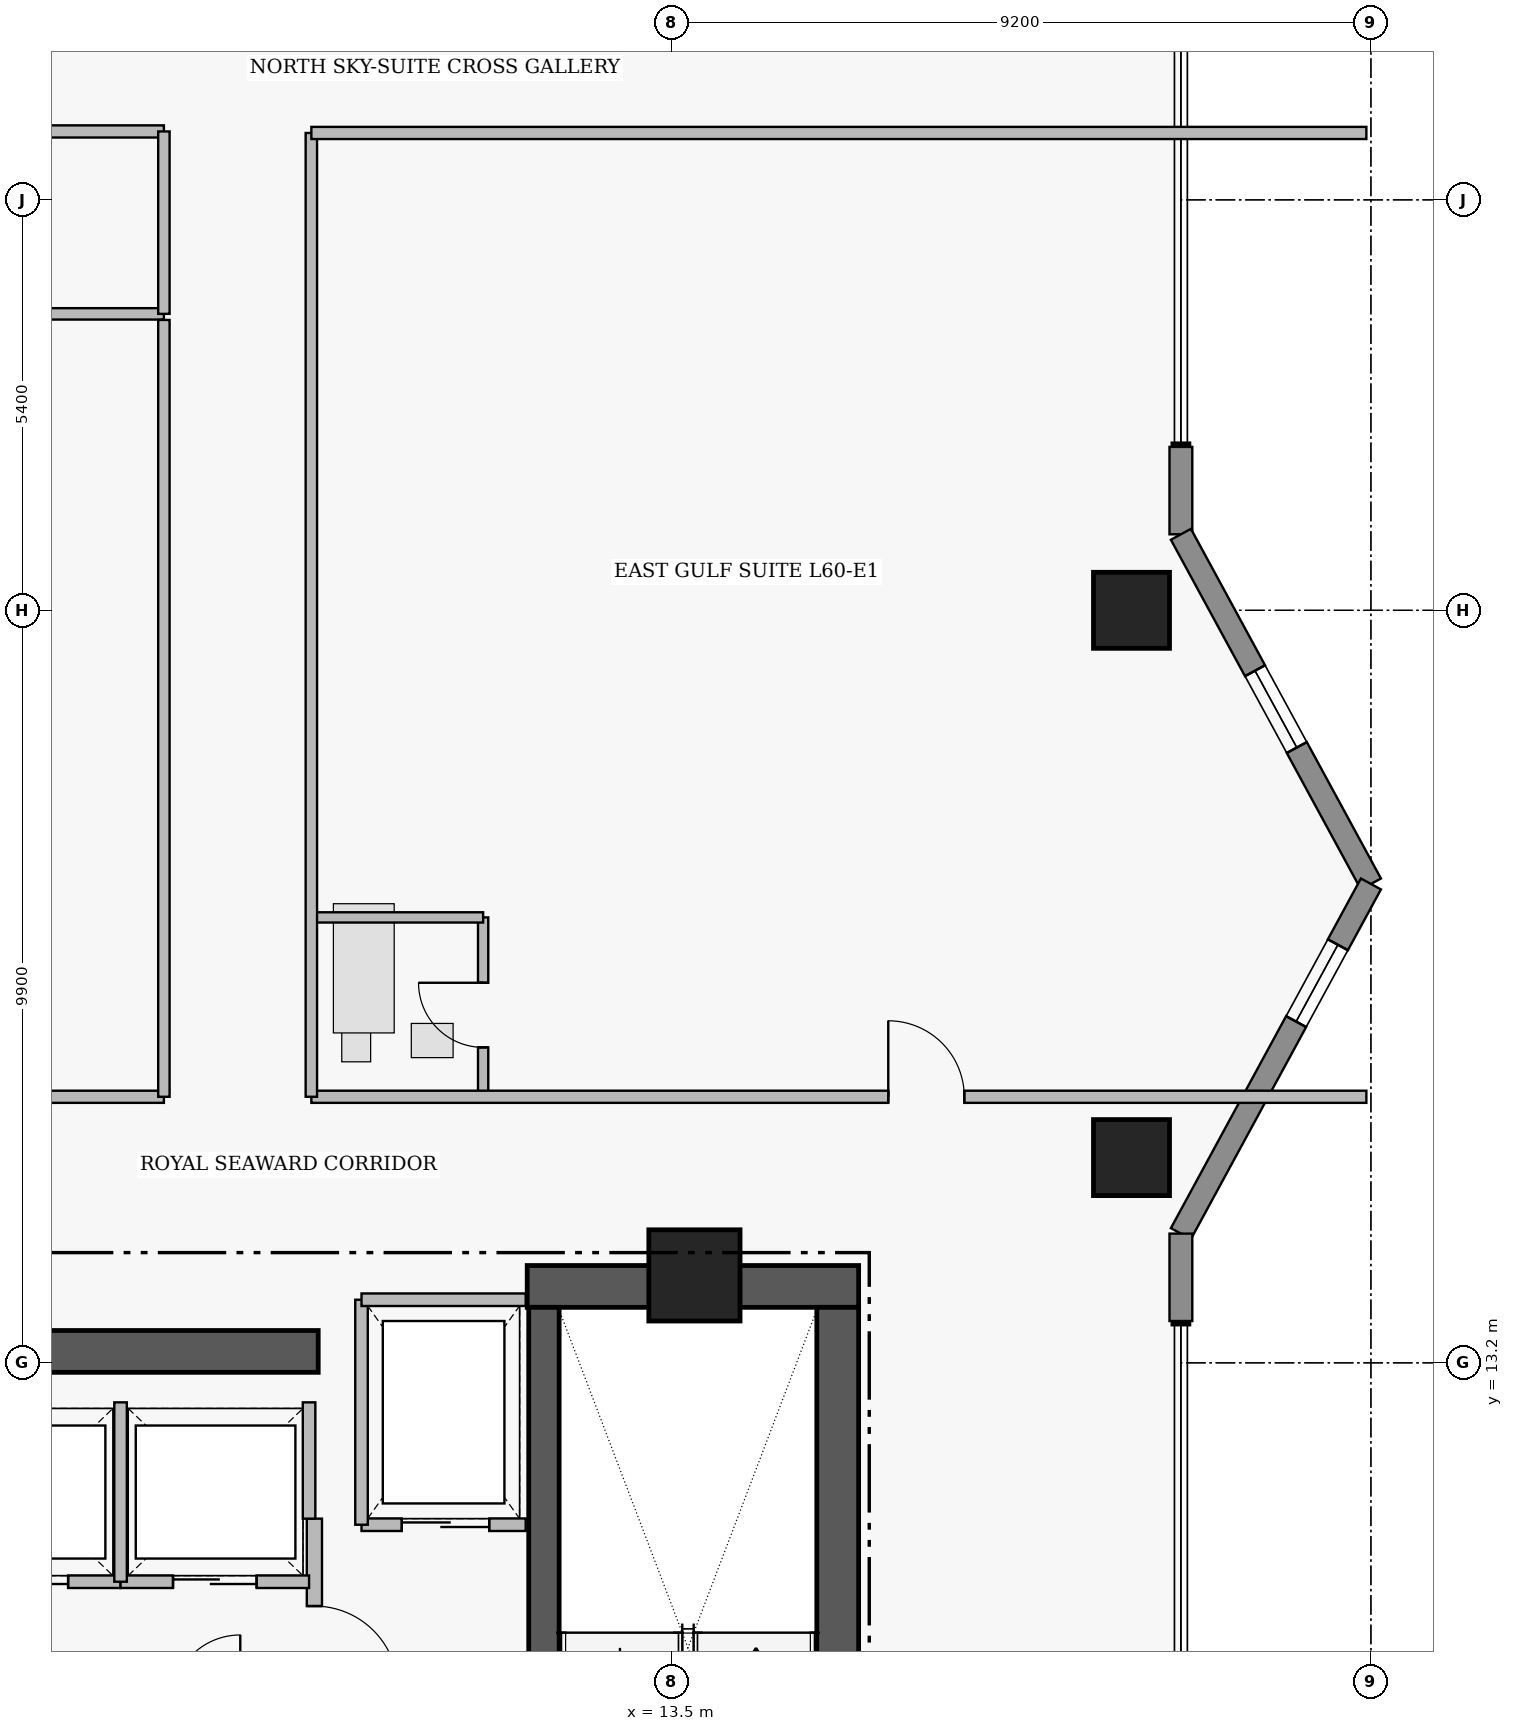
"""IFC4 building model, lengths in metres.
Left out: names, types, materials, properties, quantities, classifications, styles, units other than length and angle.
Written with IfcOpenShell. Run it as: python <this file> out.ifc"""

import sys

from ifc_helpers import new_model, si_unit, direction, frame, frame_2d, origin, origin_2d, place, context, subcontext, project, spatial, rectangle, extrude, element, fill, save


model = new_model("IFC4")
c1 = context("Model", 3, precision=1e-05, world=origin(), true_north=direction((0.0, 1.0)))
c2 = subcontext(c1, "Body", "Model", "MODEL_VIEW")
j1 = project(units=[si_unit("LENGTHUNIT", "METRE"), si_unit("PLANEANGLEUNIT", "RADIAN")], contexts=[c1])
p1 = place(None, origin())
s1 = spatial("IfcSite", under=j1, at=p1, CompositionType="ELEMENT")
p2 = place(p1, origin())
s2 = spatial("IfcBuilding", under=s1, at=p2, CompositionType="ELEMENT")
p3 = place(p2, frame((0.0, 0.0, 239.65)))
s3 = spatial("IfcBuildingStorey", under=s2, at=p3, CompositionType="ELEMENT", Elevation=239.65)
p4 = place(p3, frame((11.6, 14.205, 0.0), z_axis=(0.0, 0.0, 1.0), x_axis=(1.0, 0.0, 0.0)))
e1 = element("IfcWall", 1, at=p4, inside=s3, PredefinedType="SHEAR", context=c2, shape_type="SweptSolid", body=[
    extrude(rectangle(XDim=4.36, YDim=0.55, at=frame_2d((2.18, 0.0))), origin(), (0.0, 0.0, 1.0), 3.51),
])
p5 = place(p3, frame((15.685, 4.97, 0.0), z_axis=(0.0, 0.0, 1.0), x_axis=(0.0, 1.0, 0.0)))
e2 = element("IfcWall", 2, at=p5, inside=s3, PredefinedType="SHEAR", context=c2, shape_type="SweptSolid", body=[
    extrude(rectangle(XDim=8.96, YDim=0.55, at=frame_2d((4.48, 0.0))), origin(), (0.0, 0.0, 1.0), 3.51),
])
p6 = place(p3, frame((1.25, 13.35, 0.0), z_axis=(0.0, 0.0, 1.0), x_axis=(1.0, 0.0, 0.0)))
e3 = element("IfcWall", 3, at=p6, inside=s3, PredefinedType="SHEAR", context=c2, shape_type="SweptSolid", body=[
    extrude(rectangle(XDim=7.6, YDim=0.55, at=frame_2d((3.8, 0.0))), origin(), (0.0, 0.0, 1.0), 3.48),
])
p7 = place(p3, frame((11.82, 13.93, 0.0), z_axis=(0.0, 0.0, 1.0), x_axis=(0.0, -1.0, 0.0)))
e4 = element("IfcWall", 4, at=p7, inside=s3, PredefinedType="SHEAR", context=c2, shape_type="SweptSolid", body=[
    extrude(rectangle(XDim=8.96, YDim=0.4, at=frame_2d((4.48, 0.0))), origin(), (0.0, 0.0, 1.0), 3.51),
])
p8 = place(p7, frame((7.53, 0.0, 0.0)))
e5 = element("IfcOpeningElement", 5, at=p8, cuts=e4, PredefinedType="OPENING", context=c2, shape_type="SweptSolid", body=[
    extrude(rectangle(XDim=1.12, YDim=2.22, at=frame_2d((0.56, 1.11))), frame((0.0, 0.21, 0.0), z_axis=(0.0, -1.0, 0.0), x_axis=(1.0, 0.0, 0.0)), (0.0, 0.0, 1.0), 0.42),
])
p9 = place(p3, frame((13.8, 14.35, 0.0), z_axis=(0.0, 0.0, 1.0), x_axis=(1.0, 0.0, 0.0)))
e6 = element("IfcColumn", 6, at=p9, inside=s3, PredefinedType="COLUMN", context=c2, shape_type="SweptSolid", body=[
    extrude(rectangle(XDim=1.2, YDim=1.2, at=origin_2d()), origin(), (0.0, 0.0, 1.0), 3.7),
])
for number, where, z_axis, x_axis in (
    (7, (19.55, 15.9, 0.43), (0.0, 0.0, 1.0), (1.0, 0.0, 0.0)),
    (8, (19.55, 23.1, 0.43), (0.0, 0.0, 1.0), (1.0, 0.0, 0.0)),
):
    element("IfcColumn", number, at=place(p3, frame(where, z_axis=z_axis, x_axis=x_axis)), inside=s3, PredefinedType="COLUMN", context=c2, shape_type="SweptSolid", body=[
        extrude(rectangle(XDim=1.0, YDim=1.0, at=origin_2d()), origin(), (0.0, 0.0, 1.0), 3.27),
    ])
p10 = place(p3, frame((20.2, 25.25, 0.0), z_axis=(0.0, 0.0, 1.0), x_axis=(0.0, -1.0, 0.0)))
e9 = element("IfcWall", 9, at=p10, inside=s3, PredefinedType="STANDARD", context=c2, shape_type="SweptSolid", body=[
    extrude(rectangle(XDim=1.15, YDim=0.3, at=frame_2d((0.575, 0.0))), origin(), (0.0, 0.0, 1.0), 3.48),
])
p11 = place(p3, frame((20.2, 24.1, 0.0), z_axis=(0.0, 0.0, 1.0), x_axis=(0.477505494629, -0.878628762675, 0.0)))
e10 = element("IfcWall", 10, at=p11, inside=s3, PredefinedType="STANDARD", context=c2, shape_type="SweptSolid", body=[
    extrude(rectangle(XDim=5.236, YDim=0.3, at=frame_2d((2.618, 0.0))), origin(), (0.0, 0.0, 1.0), 3.48),
])
p12 = place(p11, frame((2.043, 0.0, 1.25)))
e11 = element("IfcOpeningElement", 11, at=p12, cuts=e10, PredefinedType="OPENING", context=c2, shape_type="SweptSolid", body=[
    extrude(rectangle(XDim=1.15, YDim=1.55, at=frame_2d((0.575, 0.775))), frame((0.0, 0.16, 0.0), z_axis=(0.0, -1.0, 0.0), x_axis=(1.0, 0.0, 0.0)), (0.0, 0.0, 1.0), 0.32),
])
p13 = place(p3, frame((22.7, 19.5, 0.0), z_axis=(0.0, 0.0, 1.0), x_axis=(-0.477505494629, -0.878628762675, 0.0)))
e12 = element("IfcWall", 12, at=p13, inside=s3, PredefinedType="STANDARD", context=c2, shape_type="SweptSolid", body=[
    extrude(rectangle(XDim=5.236, YDim=0.3, at=frame_2d((2.618, 0.0))), origin(), (0.0, 0.0, 1.0), 3.48),
])
p14 = place(p13, frame((0.911, 0.0, 1.25)))
e13 = element("IfcOpeningElement", 13, at=p14, cuts=e12, PredefinedType="OPENING", context=c2, shape_type="SweptSolid", body=[
    extrude(rectangle(XDim=1.15, YDim=1.55, at=frame_2d((0.575, 0.775))), frame((0.0, 0.16, 0.0), z_axis=(0.0, -1.0, 0.0), x_axis=(1.0, 0.0, 0.0)), (0.0, 0.0, 1.0), 0.32),
])
p15 = place(p3, frame((20.2, 14.9, 0.0), z_axis=(0.0, 0.0, 1.0), x_axis=(0.0, -1.0, 0.0)))
e14 = element("IfcWall", 14, at=p15, inside=s3, PredefinedType="STANDARD", context=c2, shape_type="SweptSolid", body=[
    extrude(rectangle(XDim=1.15, YDim=0.3, at=frame_2d((0.575, 0.0))), origin(), (0.0, 0.0, 1.0), 3.48),
])
p16 = place(p3, frame((8.8, 11.15, 0.0), z_axis=(0.0, 0.0, 1.0), x_axis=(0.0, -1.0, 0.0)))
e15 = element("IfcWall", 15, at=p16, inside=s3, PredefinedType="PARTITIONING", context=c2, shape_type="SweptSolid", body=[
    extrude(rectangle(XDim=6.1, YDim=0.2, at=frame_2d((3.05, 0.0))), origin(), (0.0, 0.0, 1.0), 3.48),
])
p17 = place(p16, frame((1.15, 0.0, 0.0)))
e16 = element("IfcOpeningElement", 16, at=p17, cuts=e15, PredefinedType="OPENING", context=c2, shape_type="SweptSolid", body=[
    extrude(rectangle(XDim=1.1, YDim=2.2, at=frame_2d((0.55, 1.1))), frame((0.0, 0.11, 0.0), z_axis=(0.0, -1.0, 0.0), x_axis=(1.0, 0.0, 0.0)), (0.0, 0.0, 1.0), 0.22),
])
p18 = place(p16, frame((4.75, 0.0, 0.0)))
e17 = element("IfcOpeningElement", 17, at=p18, cuts=e15, PredefinedType="OPENING", context=c2, shape_type="SweptSolid", body=[
    extrude(rectangle(XDim=1.1, YDim=2.2, at=frame_2d((0.55, 1.1))), frame((0.0, 0.11, 0.0), z_axis=(0.0, -1.0, 0.0), x_axis=(1.0, 0.0, 0.0)), (0.0, 0.0, 1.0), 0.22),
])
p19 = place(p3, frame((9.42, 11.07, 0.0), z_axis=(0.0, 0.0, 1.0), x_axis=(1.0, 0.0, 0.0)))
e18 = element("IfcWall", 18, at=p19, inside=s3, PredefinedType="PARTITIONING", context=c2, shape_type="SweptSolid", body=[
    extrude(rectangle(XDim=2.16, YDim=0.165, at=frame_2d((1.08, 0.0))), origin(), (0.0, 0.0, 1.0), 3.48),
])
p20 = place(p19, frame((0.53, 0.0, 0.0)))
e19 = element("IfcOpeningElement", 19, at=p20, cuts=e18, PredefinedType="OPENING", context=c2, shape_type="SweptSolid", body=[
    extrude(rectangle(XDim=1.15, YDim=2.25, at=frame_2d((0.575, 1.125))), frame((0.0, 0.093, 0.0), z_axis=(0.0, -1.0, 0.0), x_axis=(1.0, 0.0, 0.0)), (0.0, 0.0, 1.0), 0.185),
])
p21 = place(p3, frame((3.77, 10.32, 0.0), z_axis=(0.0, 0.0, 1.0), x_axis=(1.0, 0.0, 0.0)))
e20 = element("IfcWall", 20, at=p21, inside=s3, PredefinedType="PARTITIONING", context=c2, shape_type="SweptSolid", body=[
    extrude(rectangle(XDim=2.48, YDim=0.165, at=frame_2d((1.24, 0.0))), origin(), (0.0, 0.0, 1.0), 3.48),
])
p22 = place(p21, frame((0.69, 0.0, 0.0)))
e21 = element("IfcOpeningElement", 21, at=p22, cuts=e20, PredefinedType="OPENING", context=c2, shape_type="SweptSolid", body=[
    extrude(rectangle(XDim=1.1, YDim=2.25, at=frame_2d((0.55, 1.125))), frame((0.0, 0.093, 0.0), z_axis=(0.0, -1.0, 0.0), x_axis=(1.0, 0.0, 0.0)), (0.0, 0.0, 1.0), 0.185),
])
p23 = place(p3, frame((6.25, 10.32, 0.0), z_axis=(0.0, 0.0, 1.0), x_axis=(1.0, 0.0, 0.0)))
e22 = element("IfcWall", 22, at=p23, inside=s3, PredefinedType="PARTITIONING", context=c2, shape_type="SweptSolid", body=[
    extrude(rectangle(XDim=2.48, YDim=0.165, at=frame_2d((1.24, 0.0))), origin(), (0.0, 0.0, 1.0), 3.48),
])
p24 = place(p23, frame((0.69, 0.0, 0.0)))
e23 = element("IfcOpeningElement", 23, at=p24, cuts=e22, PredefinedType="OPENING", context=c2, shape_type="SweptSolid", body=[
    extrude(rectangle(XDim=1.1, YDim=2.25, at=frame_2d((0.55, 1.125))), frame((0.0, 0.093, 0.0), z_axis=(0.0, -1.0, 0.0), x_axis=(1.0, 0.0, 0.0)), (0.0, 0.0, 1.0), 0.185),
])
p25 = place(p3, frame((0.08, 29.4, 0.0), z_axis=(0.0, 0.0, 1.0), x_axis=(1.0, 0.0, 0.0)))
e24 = element("IfcWall", 24, at=p25, inside=s3, PredefinedType="PARTITIONING", context=c2, shape_type="SweptSolid", body=[
    extrude(rectangle(XDim=6.74, YDim=0.16, at=frame_2d((3.37, 0.0))), origin(), (0.0, 0.0, 1.0), 3.48),
])
p26 = place(p25, frame((1.71, 0.0, 0.0)))
e25 = element("IfcOpeningElement", 25, at=p26, cuts=e24, PredefinedType="OPENING", context=c2, shape_type="SweptSolid", body=[
    extrude(rectangle(XDim=0.92, YDim=2.12, at=frame_2d((0.46, 1.06))), frame((0.0, 0.09, 0.0), z_axis=(0.0, -1.0, 0.0), x_axis=(1.0, 0.0, 0.0)), (0.0, 0.0, 1.0), 0.18),
])
p27 = place(p3, frame((-6.82, 16.7, 0.0), z_axis=(0.0, 0.0, 1.0), x_axis=(1.0, 0.0, 0.0)))
e26 = element("IfcWall", 26, at=p27, inside=s3, PredefinedType="PARTITIONING", context=c2, shape_type="SweptSolid", body=[
    extrude(rectangle(XDim=13.64, YDim=0.16, at=frame_2d((6.82, 0.0))), origin(), (0.0, 0.0, 1.0), 3.076),
])
p28 = place(p27, frame((6.28, 0.0, 0.0)))
e27 = element("IfcOpeningElement", 27, at=p28, cuts=e26, PredefinedType="OPENING", context=c2, shape_type="SweptSolid", body=[
    extrude(rectangle(XDim=1.08, YDim=2.18, at=frame_2d((0.54, 1.09))), frame((0.0, 0.09, 0.0), z_axis=(0.0, -1.0, 0.0), x_axis=(1.0, 0.0, 0.0)), (0.0, 0.0, 1.0), 0.18),
])
p29 = place(p3, frame((11.02, 16.7, 0.0), z_axis=(0.0, 0.0, 1.0), x_axis=(0.0, 1.0, 0.0)))
e28 = element("IfcWall", 28, at=p29, inside=s3, PredefinedType="PLUMBINGWALL", context=c2, shape_type="SweptSolid", body=[
    extrude(rectangle(XDim=2.36, YDim=0.135, at=frame_2d((1.18, 0.0))), origin(), (0.0, 0.0, 1.0), 3.48),
])
p30 = place(p29, frame((0.65, 0.0, 0.0)))
e29 = element("IfcOpeningElement", 29, at=p30, cuts=e28, PredefinedType="OPENING", context=c2, shape_type="SweptSolid", body=[
    extrude(rectangle(XDim=0.85, YDim=2.1, at=frame_2d((0.425, 1.05))), frame((0.0, 0.077, 0.0), z_axis=(0.0, -1.0, 0.0), x_axis=(1.0, 0.0, 0.0)), (0.0, 0.0, 1.0), 0.155),
])
p31 = place(p3, frame((8.76, 16.7, 0.0), z_axis=(0.0, 0.0, 1.0), x_axis=(1.0, 0.0, 0.0)))
e30 = element("IfcWall", 30, at=p31, inside=s3, PredefinedType="PARTITIONING", context=c2, shape_type="SweptSolid", body=[
    extrude(rectangle(XDim=13.88, YDim=0.16, at=frame_2d((6.94, 0.0))), origin(), (0.0, 0.0, 1.0), 3.076),
])
p32 = place(p31, frame((7.59, 0.0, 0.0)))
e31 = element("IfcOpeningElement", 31, at=p32, cuts=e30, PredefinedType="OPENING", context=c2, shape_type="SweptSolid", body=[
    extrude(rectangle(XDim=1.0, YDim=2.15, at=frame_2d((0.5, 1.075))), frame((0.0, 0.09, 0.0), z_axis=(0.0, -1.0, 0.0), x_axis=(1.0, 0.0, 0.0)), (0.0, 0.0, 1.0), 0.18),
])
p33 = place(p3, frame((9.42, 11.07, 0.0), z_axis=(0.0, 0.0, 1.0), x_axis=(0.0, 1.0, 0.0)))
e32 = element("IfcWall", 32, at=p33, inside=s3, PredefinedType="PARTITIONING", context=c2, shape_type="SweptSolid", body=[
    extrude(rectangle(XDim=2.96, YDim=0.165, at=frame_2d((1.48, 0.0))), origin(), (0.0, 0.0, 1.0), 3.48),
])
p34 = place(p3, frame((9.42, 14.03, 0.0), z_axis=(0.0, 0.0, 1.0), x_axis=(1.0, 0.0, 0.0)))
e33 = element("IfcWall", 33, at=p34, inside=s3, PredefinedType="PARTITIONING", context=c2, shape_type="SweptSolid", body=[
    extrude(rectangle(XDim=2.16, YDim=0.165, at=frame_2d((1.08, 0.0))), origin(), (0.0, 0.0, 1.0), 3.48),
])
p35 = place(p3, frame((6.25, 10.32, 0.0), z_axis=(0.0, 0.0, 1.0), x_axis=(0.0, 1.0, 0.0)))
e34 = element("IfcWall", 34, at=p35, inside=s3, PredefinedType="PARTITIONING", context=c2, shape_type="SweptSolid", body=[
    extrude(rectangle(XDim=2.36, YDim=0.165, at=frame_2d((1.18, 0.0))), origin(), (0.0, 0.0, 1.0), 3.48),
])
p36 = place(p3, frame((8.73, 11.15, 0.0), z_axis=(0.0, 0.0, 1.0), x_axis=(0.0, 1.0, 0.0)))
e35 = element("IfcWall", 35, at=p36, inside=s3, PredefinedType="PARTITIONING", context=c2, shape_type="SweptSolid", body=[
    extrude(rectangle(XDim=1.53, YDim=0.165, at=frame_2d((0.765, 0.0))), origin(), (0.0, 0.0, 1.0), 3.48),
])
p37 = place(p3, frame((0.08, 27.0, 0.0), z_axis=(0.0, 0.0, 1.0), x_axis=(1.0, 0.0, 0.0)))
e36 = element("IfcWall", 36, at=p37, inside=s3, PredefinedType="PARTITIONING", context=c2, shape_type="SweptSolid", body=[
    extrude(rectangle(XDim=6.74, YDim=0.15, at=frame_2d((3.37, 0.0))), origin(), (0.0, 0.0, 1.0), 3.48),
])
p38 = place(p3, frame((6.82, 27.0, 0.0), z_axis=(0.0, 0.0, 1.0), x_axis=(0.0, 1.0, 0.0)))
e37 = element("IfcWall", 37, at=p38, inside=s3, PredefinedType="PARTITIONING", context=c2, shape_type="SweptSolid", body=[
    extrude(rectangle(XDim=2.4, YDim=0.15, at=frame_2d((1.2, 0.0))), origin(), (0.0, 0.0, 1.0), 3.48),
])
p39 = place(p3, frame((6.82, 16.7, 0.0), z_axis=(0.0, 0.0, 1.0), x_axis=(0.0, 1.0, 0.0)))
e38 = element("IfcWall", 38, at=p39, inside=s3, PredefinedType="PARTITIONING", context=c2, shape_type="SweptSolid", body=[
    extrude(rectangle(XDim=10.22, YDim=0.15, at=frame_2d((5.11, 0.0))), origin(), (0.0, 0.0, 1.0), 3.48),
])
p40 = place(p3, frame((8.76, 19.06, 0.0), z_axis=(0.0, 0.0, 1.0), x_axis=(1.0, 0.0, 0.0)))
e39 = element("IfcWall", 39, at=p40, inside=s3, PredefinedType="PLUMBINGWALL", context=c2, shape_type="SweptSolid", body=[
    extrude(rectangle(XDim=2.26, YDim=0.135, at=frame_2d((1.13, 0.0))), origin(), (0.0, 0.0, 1.0), 3.076),
])
p41 = place(p3, frame((8.76, 16.7, 0.0), z_axis=(0.0, 0.0, 1.0), x_axis=(0.0, 1.0, 0.0)))
e40 = element("IfcWall", 40, at=p41, inside=s3, PredefinedType="PARTITIONING", context=c2, shape_type="SweptSolid", body=[
    extrude(rectangle(XDim=12.68, YDim=0.15, at=frame_2d((6.34, 0.0))), origin(), (0.0, 0.0, 1.0), 3.48),
])
p42 = place(p3, frame((8.76, 29.38, 0.0), z_axis=(0.0, 0.0, 1.0), x_axis=(1.0, 0.0, 0.0)))
e41 = element("IfcWall", 41, at=p42, inside=s3, PredefinedType="PARTITIONING", context=c2, shape_type="SweptSolid", body=[
    extrude(rectangle(XDim=13.88, YDim=0.16, at=frame_2d((6.94, 0.0))), origin(), (0.0, 0.0, 1.0), 3.48),
])
p43 = place(p12, origin())
e42 = element("IfcWindow", 42, at=p43, inside=s3, PartitioningType="SINGLE_PANEL", PredefinedType="WINDOW", context=c2, shape_type="SweptSolid", body=[
    extrude(rectangle(XDim=1.15, YDim=1.55, at=frame_2d((0.575, 0.775))), frame((0.0, 0.03, 0.0), z_axis=(0.0, -1.0, 0.0), x_axis=(1.0, 0.0, 0.0)), (0.0, 0.0, 1.0), 0.06),
])
fill(e11, e42)
p44 = place(p14, origin())
e43 = element("IfcWindow", 43, at=p44, inside=s3, PartitioningType="SINGLE_PANEL", PredefinedType="WINDOW", context=c2, shape_type="SweptSolid", body=[
    extrude(rectangle(XDim=1.15, YDim=1.55, at=frame_2d((0.575, 0.775))), frame((0.0, 0.03, 0.0), z_axis=(0.0, -1.0, 0.0), x_axis=(1.0, 0.0, 0.0)), (0.0, 0.0, 1.0), 0.06),
])
fill(e13, e43)
p45 = place(p17, origin())
e44 = element("IfcDoor", 44, at=p45, inside=s3, OperationType="SINGLE_SWING_RIGHT", PredefinedType="DOOR", context=c2, shape_type="SweptSolid", body=[
    extrude(rectangle(XDim=1.1, YDim=2.2, at=frame_2d((0.55, 1.1))), frame((0.0, 0.025, 0.0), z_axis=(0.0, -1.0, 0.0), x_axis=(1.0, 0.0, 0.0)), (0.0, 0.0, 1.0), 0.05),
])
fill(e16, e44)
p46 = place(p20, origin())
e45 = element("IfcDoor", 45, at=p46, inside=s3, OperationType="SLIDING_TO_LEFT", PredefinedType="DOOR", context=c2, shape_type="SweptSolid", body=[
    extrude(rectangle(XDim=1.15, YDim=2.25, at=frame_2d((0.575, 1.125))), frame((0.0, 0.025, 0.0), z_axis=(0.0, -1.0, 0.0), x_axis=(1.0, 0.0, 0.0)), (0.0, 0.0, 1.0), 0.05),
])
fill(e19, e45)
p47 = place(p22, origin())
e46 = element("IfcDoor", 46, at=p47, inside=s3, OperationType="SLIDING_TO_LEFT", PredefinedType="DOOR", context=c2, shape_type="SweptSolid", body=[
    extrude(rectangle(XDim=1.1, YDim=2.25, at=frame_2d((0.55, 1.125))), frame((0.0, 0.025, 0.0), z_axis=(0.0, -1.0, 0.0), x_axis=(1.0, 0.0, 0.0)), (0.0, 0.0, 1.0), 0.05),
])
fill(e21, e46)
p48 = place(p24, origin())
e47 = element("IfcDoor", 47, at=p48, inside=s3, OperationType="SLIDING_TO_LEFT", PredefinedType="DOOR", context=c2, shape_type="SweptSolid", body=[
    extrude(rectangle(XDim=1.1, YDim=2.25, at=frame_2d((0.55, 1.125))), frame((0.0, 0.025, 0.0), z_axis=(0.0, -1.0, 0.0), x_axis=(1.0, 0.0, 0.0)), (0.0, 0.0, 1.0), 0.05),
])
fill(e23, e47)
p49 = place(p30, origin())
e48 = element("IfcDoor", 48, at=p49, inside=s3, OperationType="SINGLE_SWING_RIGHT", PredefinedType="DOOR", context=c2, shape_type="SweptSolid", body=[
    extrude(rectangle(XDim=0.85, YDim=2.1, at=frame_2d((0.425, 1.05))), frame((0.0, 0.025, 0.0), z_axis=(0.0, -1.0, 0.0), x_axis=(1.0, 0.0, 0.0)), (0.0, 0.0, 1.0), 0.05),
])
fill(e29, e48)
p50 = place(p32, origin())
e49 = element("IfcDoor", 49, at=p50, inside=s3, OperationType="SINGLE_SWING_LEFT", PredefinedType="DOOR", context=c2, shape_type="SweptSolid", body=[
    extrude(rectangle(XDim=1.0, YDim=2.15, at=frame_2d((0.5, 1.075))), frame((0.0, 0.025, 0.0), z_axis=(0.0, -1.0, 0.0), x_axis=(1.0, 0.0, 0.0)), (0.0, 0.0, 1.0), 0.05),
])
fill(e31, e49)
save(model, sys.argv[1])
